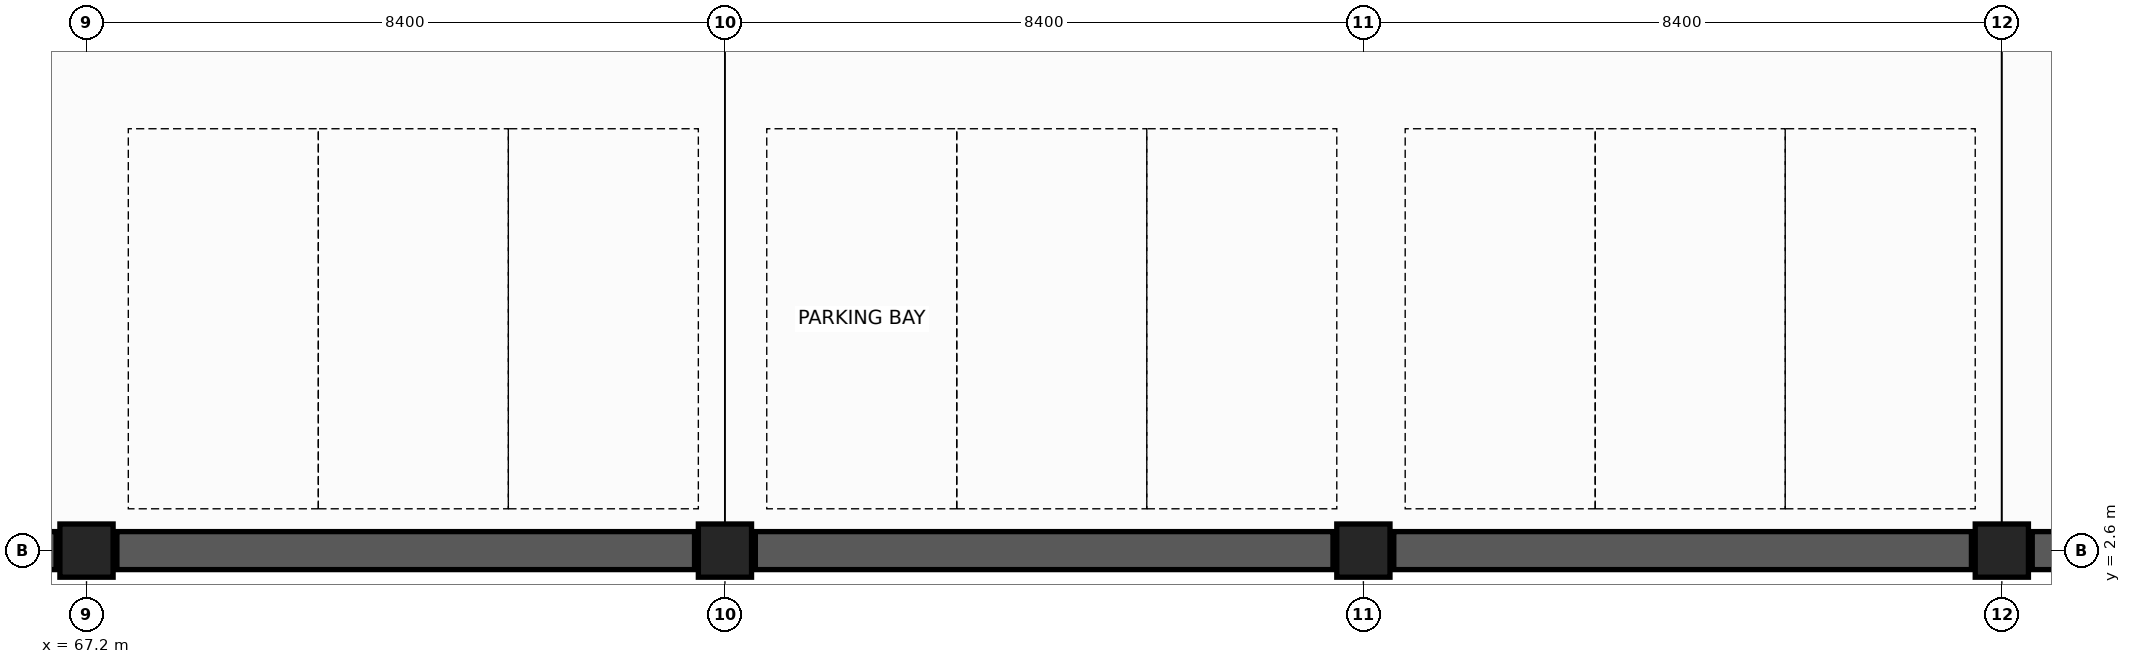
"""IFC4 building model, lengths in metres.
Left out: names, types, materials, properties, quantities, classifications, styles, units other than length and angle.
Written with IfcOpenShell. Run it as: python <this file> out.ifc"""

import sys

from ifc_helpers import new_model, si_unit, direction, frame, frame_2d, origin, origin_2d, place, context, subcontext, project, spatial, rectangle, extrude, element, save


model = new_model("IFC4")
c1 = context("Model", 3, precision=1e-05, world=origin(), true_north=direction((0.0, 1.0)))
c2 = subcontext(c1, "Body", "Model", "MODEL_VIEW")
j1 = project(units=[si_unit("LENGTHUNIT", "METRE"), si_unit("PLANEANGLEUNIT", "RADIAN")], contexts=[c1])
p1 = place(None, origin())
s1 = spatial("IfcSite", under=j1, at=p1, CompositionType="ELEMENT")
p2 = place(p1, origin())
s2 = spatial("IfcBuilding", under=s1, at=p2, CompositionType="ELEMENT")
p3 = place(p2, frame((0.0, 0.0, -5.4)))
s3 = spatial("IfcBuildingStorey", under=s2, at=p3, CompositionType="ELEMENT", Elevation=-5.4)
for number, where, z_axis, x_axis in (
    (1, (67.2, 2.6, -0.4), (0.0, 0.0, 1.0), (1.0, 0.0, 0.0)),
    (2, (75.6, 2.6, -0.4), (0.0, 0.0, 1.0), (1.0, 0.0, 0.0)),
    (3, (84.0, 2.6, -0.4), (0.0, 0.0, 1.0), (1.0, 0.0, 0.0)),
    (4, (92.4, 2.6, -0.4), (0.0, 0.0, 1.0), (1.0, 0.0, 0.0)),
):
    element("IfcColumn", number, at=place(p3, frame(where, z_axis=z_axis, x_axis=x_axis)), inside=s3, PredefinedType="COLUMN", context=c2, shape_type="SweptSolid", body=[
        extrude(rectangle(XDim=0.7, YDim=0.7, at=origin_2d()), origin(), (0.0, 0.0, 1.0), 5.8),
    ])
p4 = place(p3, frame((100.4, 2.6, 0.0), z_axis=(0.0, 0.0, 1.0), x_axis=(-1.0, 0.0, 0.0)))
e5 = element("IfcWall", 5, at=p4, inside=s3, PredefinedType="USERDEFINED", context=c2, shape_type="SweptSolid", body=[
    extrude(rectangle(XDim=7.6, YDim=0.5, at=frame_2d((3.8, 0.0))), origin(), (0.0, 0.0, 1.0), 5.08),
])
for number, where, z_axis, x_axis in (
    (6, (92.0, 2.6, 0.0), (0.0, 0.0, 1.0), (-1.0, 0.0, 0.0)),
    (7, (83.6, 2.6, 0.0), (0.0, 0.0, 1.0), (-1.0, 0.0, 0.0)),
):
    element("IfcWall", number, at=place(p3, frame(where, z_axis=z_axis, x_axis=x_axis)), inside=s3, PredefinedType="USERDEFINED", context=c2, shape_type="SweptSolid", body=[
        extrude(rectangle(XDim=7.6, YDim=0.5, at=frame_2d((3.8, 0.0))), origin(), (0.0, 0.0, 1.0), 5.08),
    ])
p5 = place(p3, frame((75.2, 2.6, 0.0), z_axis=(0.0, 0.0, 1.0), x_axis=(-1.0, 0.0, 0.0)))
e8 = element("IfcWall", 8, at=p5, inside=s3, PredefinedType="USERDEFINED", context=c2, shape_type="SweptSolid", body=[
    extrude(rectangle(XDim=7.6, YDim=0.5, at=frame_2d((3.8, 0.0))), origin(), (0.0, 0.0, 1.0), 5.08),
])
p6 = place(p3, frame((66.8, 2.6, 0.0), z_axis=(0.0, 0.0, 1.0), x_axis=(-1.0, 0.0, 0.0)))
e9 = element("IfcWall", 9, at=p6, inside=s3, PredefinedType="USERDEFINED", context=c2, shape_type="SweptSolid", body=[
    extrude(rectangle(XDim=7.6, YDim=0.5, at=frame_2d((3.8, 0.0))), origin(), (0.0, 0.0, 1.0), 5.08),
])
save(model, sys.argv[1])
